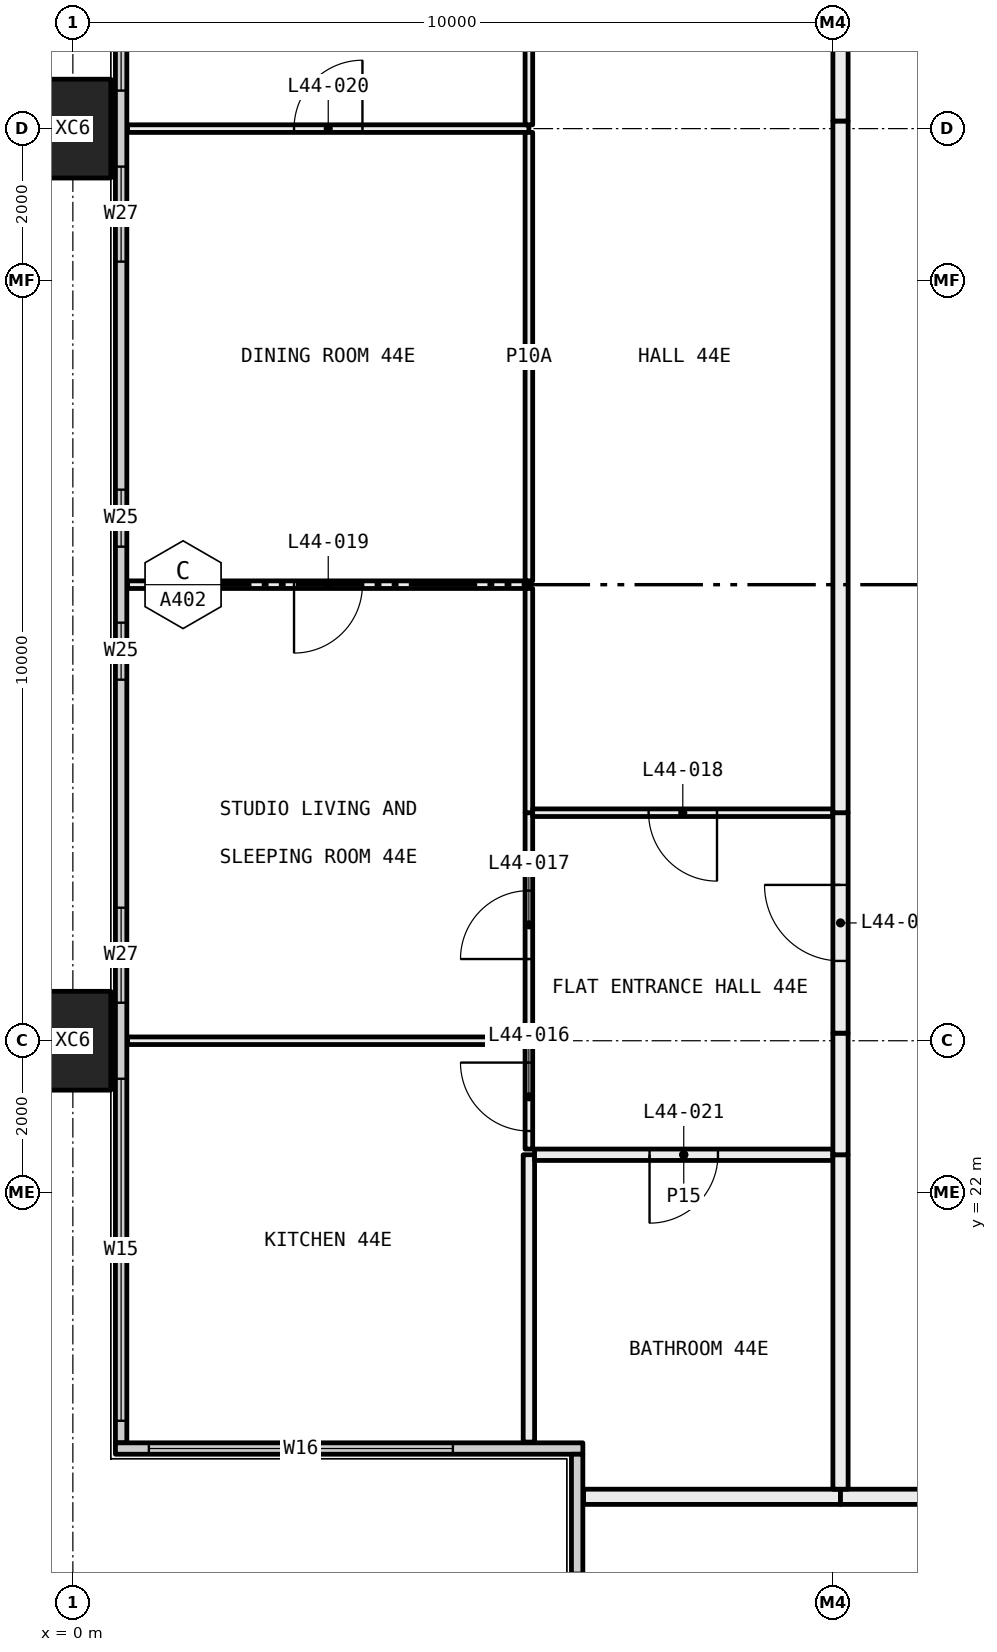
"""IFC4 building model, lengths in metres.
Left out: names, types, materials, properties, quantities, classifications, styles, units other than length and angle.
Written with IfcOpenShell. Run it as: python <this file> out.ifc"""

import sys

from ifc_helpers import new_model, si_unit, direction, frame, frame_2d, origin, origin_2d, place, context, subcontext, project, spatial, rectangle, hollow_rectangle, extrude, element, fill, save


model = new_model("IFC4")
c1 = context("Model", 3, precision=1e-05, world=origin(), true_north=direction((0.0, 1.0)))
c2 = subcontext(c1, "Body", "Model", "MODEL_VIEW")
j1 = project(units=[si_unit("LENGTHUNIT", "METRE"), si_unit("PLANEANGLEUNIT", "RADIAN")], contexts=[c1])
p1 = place(None, origin())
s1 = spatial("IfcSite", under=j1, at=p1, CompositionType="ELEMENT")
p2 = place(p1, origin())
s2 = spatial("IfcBuilding", under=s1, at=p2, CompositionType="ELEMENT")
p3 = place(p2, frame((0.0, 0.0, 168.6)))
s3 = spatial("IfcBuildingStorey", under=s2, at=p3, CompositionType="ELEMENT", Elevation=168.6)
for number, where, z_axis, x_axis in (
    (1, (0.0, 24.0, -0.4), (0.0, 0.0, 1.0), (0.0, 1.0, 0.0)),
    (2, (0.0, 36.0, -0.4), (0.0, 0.0, 1.0), (0.0, 1.0, 0.0)),
):
    element("IfcColumn", number, at=place(p3, frame(where, z_axis=z_axis, x_axis=x_axis)), inside=s3, PredefinedType="COLUMN", context=c2, shape_type="SweptSolid", body=[
        extrude(hollow_rectangle(XDim=1.3, YDim=1.0, WallThickness=0.05, at=origin_2d()), origin(), (0.0, 0.0, 1.0), 3.45),
    ])
p4 = place(p3, frame((0.635, 18.71, 0.0), z_axis=(0.0, 0.0, 1.0), x_axis=(0.0, 1.0, 0.0)))
e3 = element("IfcWall", 3, at=p4, inside=s3, PredefinedType="ELEMENTEDWALL", context=c2, shape_type="SweptSolid", body=[
    extrude(rectangle(XDim=22.58, YDim=0.15, at=frame_2d((11.29, 0.0))), origin(), (0.0, 0.0, 1.0), 3.05),
])
p5 = place(p4, frame((0.29, 0.0, 0.45)))
e4 = element("IfcOpeningElement", 4, at=p5, cuts=e3, PredefinedType="OPENING", context=c2, shape_type="SweptSolid", body=[
    extrude(rectangle(XDim=4.5, YDim=2.55, at=frame_2d((2.25, 1.275))), frame((0.0, 0.085, 0.0), z_axis=(0.0, -1.0, 0.0), x_axis=(1.0, 0.0, 0.0)), (0.0, 0.0, 1.0), 0.17),
])
p6 = place(p4, frame((5.79, 0.0, 0.45)))
e5 = element("IfcOpeningElement", 5, at=p6, cuts=e3, PredefinedType="OPENING", context=c2, shape_type="SweptSolid", body=[
    extrude(rectangle(XDim=1.25, YDim=2.55, at=frame_2d((0.625, 1.275))), frame((0.0, 0.085, 0.0), z_axis=(0.0, -1.0, 0.0), x_axis=(1.0, 0.0, 0.0)), (0.0, 0.0, 1.0), 0.17),
])
p7 = place(p4, frame((10.04, 0.0, 0.45)))
e6 = element("IfcOpeningElement", 6, at=p7, cuts=e3, PredefinedType="OPENING", context=c2, shape_type="SweptSolid", body=[
    extrude(rectangle(XDim=0.75, YDim=2.55, at=frame_2d((0.375, 1.275))), frame((0.0, 0.085, 0.0), z_axis=(0.0, -1.0, 0.0), x_axis=(1.0, 0.0, 0.0)), (0.0, 0.0, 1.0), 0.17),
])
p8 = place(p4, frame((11.79, 0.0, 0.45)))
e7 = element("IfcOpeningElement", 7, at=p8, cuts=e3, PredefinedType="OPENING", context=c2, shape_type="SweptSolid", body=[
    extrude(rectangle(XDim=0.75, YDim=2.55, at=frame_2d((0.375, 1.275))), frame((0.0, 0.085, 0.0), z_axis=(0.0, -1.0, 0.0), x_axis=(1.0, 0.0, 0.0)), (0.0, 0.0, 1.0), 0.17),
])
p9 = place(p4, frame((15.54, 0.0, 0.45)))
e8 = element("IfcOpeningElement", 8, at=p9, cuts=e3, PredefinedType="OPENING", context=c2, shape_type="SweptSolid", body=[
    extrude(rectangle(XDim=1.25, YDim=2.55, at=frame_2d((0.625, 1.275))), frame((0.0, 0.085, 0.0), z_axis=(0.0, -1.0, 0.0), x_axis=(1.0, 0.0, 0.0)), (0.0, 0.0, 1.0), 0.17),
])
p10 = place(p4, frame((17.79, 0.0, 0.45)))
e9 = element("IfcOpeningElement", 9, at=p10, cuts=e3, PredefinedType="OPENING", context=c2, shape_type="SweptSolid", body=[
    extrude(rectangle(XDim=4.5, YDim=2.55, at=frame_2d((2.25, 1.275))), frame((0.0, 0.085, 0.0), z_axis=(0.0, -1.0, 0.0), x_axis=(1.0, 0.0, 0.0)), (0.0, 0.0, 1.0), 0.17),
])
p11 = place(p3, frame((0.56, 18.635, 0.0), z_axis=(0.0, 0.0, 1.0), x_axis=(1.0, 0.0, 0.0)))
e10 = element("IfcWall", 10, at=p11, inside=s3, PredefinedType="ELEMENTEDWALL", context=c2, shape_type="SweptSolid", body=[
    extrude(rectangle(XDim=6.15, YDim=0.15, at=frame_2d((3.075, 0.0))), origin(), (0.0, 0.0, 1.0), 3.05),
])
p12 = place(p11, frame((0.44, 0.0, 0.45)))
e11 = element("IfcOpeningElement", 11, at=p12, cuts=e10, PredefinedType="OPENING", context=c2, shape_type="SweptSolid", body=[
    extrude(rectangle(XDim=4.0, YDim=2.55, at=frame_2d((2.0, 1.275))), frame((0.0, 0.085, 0.0), z_axis=(0.0, -1.0, 0.0), x_axis=(1.0, 0.0, 0.0)), (0.0, 0.0, 1.0), 0.17),
])
p13 = place(p3, frame((6.635, 12.71, 0.0), z_axis=(0.0, 0.0, 1.0), x_axis=(0.0, 1.0, 0.0)))
e12 = element("IfcWall", 12, at=p13, inside=s3, PredefinedType="ELEMENTEDWALL", context=c2, shape_type="SweptSolid", body=[
    extrude(rectangle(XDim=5.85, YDim=0.15, at=frame_2d((2.925, 0.0))), origin(), (0.0, 0.0, 1.0), 3.05),
])
p14 = place(p13, frame((0.29, 0.0, 0.45)))
e13 = element("IfcOpeningElement", 13, at=p14, cuts=e12, PredefinedType="OPENING", context=c2, shape_type="SweptSolid", body=[
    extrude(rectangle(XDim=4.0, YDim=2.55, at=frame_2d((2.0, 1.275))), frame((0.0, 0.085, 0.0), z_axis=(0.0, -1.0, 0.0), x_axis=(1.0, 0.0, 0.0)), (0.0, 0.0, 1.0), 0.17),
])
p15 = place(p3, frame((10.1, 18.0, 0.0), z_axis=(0.0, 0.0, 1.0), x_axis=(-1.0, 0.0, 0.0)))
e14 = element("IfcWall", 14, at=p15, inside=s3, PredefinedType="PARTITIONING", context=c2, shape_type="SweptSolid", body=[
    extrude(rectangle(XDim=3.38, YDim=0.2, at=frame_2d((1.69, 0.0))), origin(), (0.0, 0.0, 1.0), 3.05),
])
p16 = place(p3, frame((12.0, 18.0, 0.0), z_axis=(0.0, 0.0, 1.0), x_axis=(-1.0, 0.0, 0.0)))
e15 = element("IfcWall", 15, at=p16, inside=s3, PredefinedType="PARTITIONING", context=c2, shape_type="SweptSolid", body=[
    extrude(rectangle(XDim=1.9, YDim=0.2, at=frame_2d((0.95, 0.0))), origin(), (0.0, 0.0, 1.0), 3.05),
])
p17 = place(p3, frame((6.0, 24.0, 0.0), z_axis=(0.0, 0.0, 1.0), x_axis=(-1.0, 0.0, 0.0)))
e16 = element("IfcWall", 16, at=p17, inside=s3, PredefinedType="PARTITIONING", context=c2, shape_type="SweptSolid", body=[
    extrude(rectangle(XDim=5.28, YDim=0.1, at=frame_2d((2.64, 0.0))), origin(), (0.0, 0.0, 1.0), 2.45),
])
p18 = place(p3, frame((6.0, 18.72, 0.0), z_axis=(0.0, 0.0, 1.0), x_axis=(0.0, 1.0, 0.0)))
e17 = element("IfcWall", 17, at=p18, inside=s3, PredefinedType="PARTITIONING", context=c2, shape_type="SweptSolid", body=[
    extrude(rectangle(XDim=3.78, YDim=0.15, at=frame_2d((1.89, 0.0))), origin(), (0.0, 0.0, 1.0), 3.05),
])
p19 = place(p3, frame((6.0, 22.575, 0.0), z_axis=(0.0, 0.0, 1.0), x_axis=(0.0, 1.0, 0.0)))
e18 = element("IfcWall", 18, at=p19, inside=s3, PredefinedType="PARTITIONING", context=c2, shape_type="SweptSolid", body=[
    extrude(rectangle(XDim=1.375, YDim=0.1, at=frame_2d((0.688, 0.0))), origin(), (0.0, 0.0, 1.0), 2.45),
])
p20 = place(p19, frame((0.238, 0.0, 0.0)))
e19 = element("IfcOpeningElement", 19, at=p20, cuts=e18, PredefinedType="OPENING", context=c2, shape_type="SweptSolid", body=[
    extrude(rectangle(XDim=0.9, YDim=2.1, at=frame_2d((0.45, 1.05))), frame((0.0, 0.06, 0.0), z_axis=(0.0, -1.0, 0.0), x_axis=(1.0, 0.0, 0.0)), (0.0, 0.0, 1.0), 0.12),
])
p21 = place(p3, frame((6.0, 30.0, 0.0), z_axis=(0.0, 0.0, 1.0), x_axis=(-1.0, 0.0, 0.0)))
e20 = element("IfcWall", 20, at=p21, inside=s3, PredefinedType="PARTITIONING", context=c2, shape_type="SweptSolid", body=[
    extrude(rectangle(XDim=5.28, YDim=0.1, at=frame_2d((2.64, 0.0))), origin(), (0.0, 0.0, 1.0), 3.05),
])
p22 = place(p21, frame((2.19, 0.0, 0.0)))
e21 = element("IfcOpeningElement", 21, at=p22, cuts=e20, PredefinedType="OPENING", context=c2, shape_type="SweptSolid", body=[
    extrude(rectangle(XDim=0.9, YDim=2.1, at=frame_2d((0.45, 1.05))), frame((0.0, 0.06, 0.0), z_axis=(0.0, -1.0, 0.0), x_axis=(1.0, 0.0, 0.0)), (0.0, 0.0, 1.0), 0.12),
])
p23 = place(p3, frame((6.0, 24.05, 0.0), z_axis=(0.0, 0.0, 1.0), x_axis=(0.0, 1.0, 0.0)))
e22 = element("IfcWall", 22, at=p23, inside=s3, PredefinedType="PARTITIONING", context=c2, shape_type="SweptSolid", body=[
    extrude(rectangle(XDim=2.95, YDim=0.1, at=frame_2d((1.475, 0.0))), origin(), (0.0, 0.0, 1.0), 2.45),
])
p24 = place(p23, frame((1.025, 0.0, 0.0)))
e23 = element("IfcOpeningElement", 23, at=p24, cuts=e22, PredefinedType="OPENING", context=c2, shape_type="SweptSolid", body=[
    extrude(rectangle(XDim=0.9, YDim=2.1, at=frame_2d((0.45, 1.05))), frame((0.0, 0.06, 0.0), z_axis=(0.0, -1.0, 0.0), x_axis=(1.0, 0.0, 0.0)), (0.0, 0.0, 1.0), 0.12),
])
p25 = place(p3, frame((6.0, 27.0, 0.0), z_axis=(0.0, 0.0, 1.0), x_axis=(0.0, 1.0, 0.0)))
e24 = element("IfcWall", 24, at=p25, inside=s3, PredefinedType="PARTITIONING", context=c2, shape_type="SweptSolid", body=[
    extrude(rectangle(XDim=2.95, YDim=0.1, at=frame_2d((1.475, 0.0))), origin(), (0.0, 0.0, 1.0), 3.05),
])
p26 = place(p3, frame((6.0, 36.0, 0.0), z_axis=(0.0, 0.0, 1.0), x_axis=(-1.0, 0.0, 0.0)))
e25 = element("IfcWall", 25, at=p26, inside=s3, PredefinedType="PARTITIONING", context=c2, shape_type="SweptSolid", body=[
    extrude(rectangle(XDim=5.28, YDim=0.1, at=frame_2d((2.64, 0.0))), origin(), (0.0, 0.0, 1.0), 2.45),
])
p27 = place(p26, frame((2.19, 0.0, 0.0)))
e26 = element("IfcOpeningElement", 26, at=p27, cuts=e25, PredefinedType="OPENING", context=c2, shape_type="SweptSolid", body=[
    extrude(rectangle(XDim=0.9, YDim=2.1, at=frame_2d((0.45, 1.05))), frame((0.0, 0.06, 0.0), z_axis=(0.0, -1.0, 0.0), x_axis=(1.0, 0.0, 0.0)), (0.0, 0.0, 1.0), 0.12),
])
p28 = place(p3, frame((6.0, 30.05, 0.0), z_axis=(0.0, 0.0, 1.0), x_axis=(0.0, 1.0, 0.0)))
e27 = element("IfcWall", 27, at=p28, inside=s3, PredefinedType="PARTITIONING", context=c2, shape_type="SweptSolid", body=[
    extrude(rectangle(XDim=5.9, YDim=0.1, at=frame_2d((2.95, 0.0))), origin(), (0.0, 0.0, 1.0), 2.45),
])
p29 = place(p3, frame((6.0, 36.05, 0.0), z_axis=(0.0, 0.0, 1.0), x_axis=(0.0, 1.0, 0.0)))
e28 = element("IfcWall", 28, at=p29, inside=s3, PredefinedType="PARTITIONING", context=c2, shape_type="SweptSolid", body=[
    extrude(rectangle(XDim=2.875, YDim=0.1, at=frame_2d((1.438, 0.0))), origin(), (0.0, 0.0, 1.0), 2.45),
])
p30 = place(p3, frame((10.0, 22.5, 0.0), z_axis=(0.0, 0.0, 1.0), x_axis=(-1.0, 0.0, 0.0)))
e29 = element("IfcWall", 29, at=p30, inside=s3, PredefinedType="PARTITIONING", context=c2, shape_type="SweptSolid", body=[
    extrude(rectangle(XDim=3.925, YDim=0.15, at=frame_2d((1.962, 0.0))), origin(), (0.0, 0.0, 1.0), 3.05),
])
p31 = place(p30, frame((1.512, 0.0, 0.0)))
e30 = element("IfcOpeningElement", 30, at=p31, cuts=e29, PredefinedType="OPENING", context=c2, shape_type="SweptSolid", body=[
    extrude(rectangle(XDim=0.9, YDim=2.1, at=frame_2d((0.45, 1.05))), frame((0.0, 0.085, 0.0), z_axis=(0.0, -1.0, 0.0), x_axis=(1.0, 0.0, 0.0)), (0.0, 0.0, 1.0), 0.17),
])
p32 = place(p3, frame((10.1, 18.1, 0.0), z_axis=(0.0, 0.0, 1.0), x_axis=(0.0, 1.0, 0.0)))
e31 = element("IfcWall", 31, at=p32, inside=s3, PredefinedType="PARTITIONING", context=c2, shape_type="SweptSolid", body=[
    extrude(rectangle(XDim=4.4, YDim=0.2, at=frame_2d((2.2, 0.0))), origin(), (0.0, 0.0, 1.0), 3.05),
])
p33 = place(p3, frame((10.0, 27.0, 0.0), z_axis=(0.0, 0.0, 1.0), x_axis=(-1.0, 0.0, 0.0)))
e32 = element("IfcWall", 32, at=p33, inside=s3, PredefinedType="PARTITIONING", context=c2, shape_type="SweptSolid", body=[
    extrude(rectangle(XDim=3.95, YDim=0.1, at=frame_2d((1.975, 0.0))), origin(), (0.0, 0.0, 1.0), 3.05),
])
p34 = place(p33, frame((1.525, 0.0, 0.0)))
e33 = element("IfcOpeningElement", 33, at=p34, cuts=e32, PredefinedType="OPENING", context=c2, shape_type="SweptSolid", body=[
    extrude(rectangle(XDim=0.9, YDim=2.1, at=frame_2d((0.45, 1.05))), frame((0.0, 0.06, 0.0), z_axis=(0.0, -1.0, 0.0), x_axis=(1.0, 0.0, 0.0)), (0.0, 0.0, 1.0), 0.12),
])
p35 = place(p3, frame((10.1, 22.5, 0.0), z_axis=(0.0, 0.0, 1.0), x_axis=(0.0, 1.0, 0.0)))
e34 = element("IfcWall", 34, at=p35, inside=s3, PredefinedType="PARTITIONING", context=c2, shape_type="SweptSolid", body=[
    extrude(rectangle(XDim=1.6, YDim=0.2, at=frame_2d((0.8, 0.0))), origin(), (0.0, 0.0, 1.0), 2.45),
])
p36 = place(p3, frame((10.1, 24.1, 0.0), z_axis=(0.0, 0.0, 1.0), x_axis=(0.0, 1.0, 0.0)))
e35 = element("IfcWall", 35, at=p36, inside=s3, PredefinedType="PARTITIONING", context=c2, shape_type="SweptSolid", body=[
    extrude(rectangle(XDim=2.9, YDim=0.2, at=frame_2d((1.45, 0.0))), origin(), (0.0, 0.0, 1.0), 3.05),
])
p37 = place(p36, frame((0.95, 0.0, 0.0)))
e36 = element("IfcOpeningElement", 36, at=p37, cuts=e35, PredefinedType="OPENING", context=c2, shape_type="SweptSolid", body=[
    extrude(rectangle(XDim=1.0, YDim=2.1, at=frame_2d((0.5, 1.05))), frame((0.0, 0.11, 0.0), z_axis=(0.0, -1.0, 0.0), x_axis=(1.0, 0.0, 0.0)), (0.0, 0.0, 1.0), 0.22),
])
p38 = place(p3, frame((10.1, 27.0, 0.0), z_axis=(0.0, 0.0, 1.0), x_axis=(0.0, 1.0, 0.0)))
e37 = element("IfcWall", 37, at=p38, inside=s3, PredefinedType="PARTITIONING", context=c2, shape_type="SweptSolid", body=[
    extrude(rectangle(XDim=9.1, YDim=0.2, at=frame_2d((4.55, 0.0))), origin(), (0.0, 0.0, 1.0), 2.45),
])
p39 = place(p3, frame((10.1, 36.1, 0.0), z_axis=(0.0, 0.0, 1.0), x_axis=(0.0, 1.0, 0.0)))
e38 = element("IfcWall", 38, at=p39, inside=s3, PredefinedType="PARTITIONING", context=c2, shape_type="SweptSolid", body=[
    extrude(rectangle(XDim=2.9, YDim=0.2, at=frame_2d((1.45, 0.0))), origin(), (0.0, 0.0, 1.0), 3.05),
])
p40 = place(p5, origin())
e39 = element("IfcWindow", 39, at=p40, inside=s3, PartitioningType="SINGLE_PANEL", PredefinedType="WINDOW", context=c2, shape_type="SweptSolid", body=[
    extrude(rectangle(XDim=4.5, YDim=2.55, at=frame_2d((2.25, 1.275))), frame((0.0, 0.03, 0.0), z_axis=(0.0, -1.0, 0.0), x_axis=(1.0, 0.0, 0.0)), (0.0, 0.0, 1.0), 0.06),
])
fill(e4, e39)
p41 = place(p6, origin())
e40 = element("IfcWindow", 40, at=p41, inside=s3, PartitioningType="SINGLE_PANEL", PredefinedType="WINDOW", context=c2, shape_type="SweptSolid", body=[
    extrude(rectangle(XDim=1.25, YDim=2.55, at=frame_2d((0.625, 1.275))), frame((0.0, 0.03, 0.0), z_axis=(0.0, -1.0, 0.0), x_axis=(1.0, 0.0, 0.0)), (0.0, 0.0, 1.0), 0.06),
])
fill(e5, e40)
p42 = place(p7, origin())
e41 = element("IfcWindow", 41, at=p42, inside=s3, PartitioningType="SINGLE_PANEL", PredefinedType="WINDOW", context=c2, shape_type="SweptSolid", body=[
    extrude(rectangle(XDim=0.75, YDim=2.55, at=frame_2d((0.375, 1.275))), frame((0.0, 0.03, 0.0), z_axis=(0.0, -1.0, 0.0), x_axis=(1.0, 0.0, 0.0)), (0.0, 0.0, 1.0), 0.06),
])
fill(e6, e41)
p43 = place(p8, origin())
e42 = element("IfcWindow", 42, at=p43, inside=s3, PartitioningType="SINGLE_PANEL", PredefinedType="WINDOW", context=c2, shape_type="SweptSolid", body=[
    extrude(rectangle(XDim=0.75, YDim=2.55, at=frame_2d((0.375, 1.275))), frame((0.0, 0.03, 0.0), z_axis=(0.0, -1.0, 0.0), x_axis=(1.0, 0.0, 0.0)), (0.0, 0.0, 1.0), 0.06),
])
fill(e7, e42)
p44 = place(p9, origin())
e43 = element("IfcWindow", 43, at=p44, inside=s3, PartitioningType="SINGLE_PANEL", PredefinedType="WINDOW", context=c2, shape_type="SweptSolid", body=[
    extrude(rectangle(XDim=1.25, YDim=2.55, at=frame_2d((0.625, 1.275))), frame((0.0, 0.03, 0.0), z_axis=(0.0, -1.0, 0.0), x_axis=(1.0, 0.0, 0.0)), (0.0, 0.0, 1.0), 0.06),
])
fill(e8, e43)
p45 = place(p10, origin())
e44 = element("IfcWindow", 44, at=p45, inside=s3, PartitioningType="SINGLE_PANEL", PredefinedType="WINDOW", context=c2, shape_type="SweptSolid", body=[
    extrude(rectangle(XDim=4.5, YDim=2.55, at=frame_2d((2.25, 1.275))), frame((0.0, 0.03, 0.0), z_axis=(0.0, -1.0, 0.0), x_axis=(1.0, 0.0, 0.0)), (0.0, 0.0, 1.0), 0.06),
])
fill(e9, e44)
p46 = place(p12, origin())
e45 = element("IfcWindow", 45, at=p46, inside=s3, PartitioningType="SINGLE_PANEL", PredefinedType="WINDOW", context=c2, shape_type="SweptSolid", body=[
    extrude(rectangle(XDim=4.0, YDim=2.55, at=frame_2d((2.0, 1.275))), frame((0.0, 0.03, 0.0), z_axis=(0.0, -1.0, 0.0), x_axis=(1.0, 0.0, 0.0)), (0.0, 0.0, 1.0), 0.06),
])
fill(e11, e45)
p47 = place(p37, origin())
e46 = element("IfcDoor", 46, at=p47, inside=s3, OperationType="SINGLE_SWING_LEFT", PredefinedType="DOOR", context=c2, shape_type="SweptSolid", body=[
    extrude(rectangle(XDim=1.0, YDim=2.1, at=frame_2d((0.5, 1.05))), frame((0.0, 0.025, 0.0), z_axis=(0.0, -1.0, 0.0), x_axis=(1.0, 0.0, 0.0)), (0.0, 0.0, 1.0), 0.05),
])
fill(e36, e46)
p48 = place(p20, origin())
e47 = element("IfcDoor", 47, at=p48, inside=s3, OperationType="SINGLE_SWING_LEFT", PredefinedType="DOOR", context=c2, shape_type="SweptSolid", body=[
    extrude(rectangle(XDim=0.9, YDim=2.1, at=frame_2d((0.45, 1.05))), frame((0.0, 0.025, 0.0), z_axis=(0.0, -1.0, 0.0), x_axis=(1.0, 0.0, 0.0)), (0.0, 0.0, 1.0), 0.05),
])
fill(e19, e47)
p49 = place(p24, origin())
e48 = element("IfcDoor", 48, at=p49, inside=s3, OperationType="SINGLE_SWING_RIGHT", PredefinedType="DOOR", context=c2, shape_type="SweptSolid", body=[
    extrude(rectangle(XDim=0.9, YDim=2.1, at=frame_2d((0.45, 1.05))), frame((0.0, 0.025, 0.0), z_axis=(0.0, -1.0, 0.0), x_axis=(1.0, 0.0, 0.0)), (0.0, 0.0, 1.0), 0.05),
])
fill(e23, e48)
p50 = place(p34, origin())
e49 = element("IfcDoor", 49, at=p50, inside=s3, OperationType="SINGLE_SWING_RIGHT", PredefinedType="DOOR", context=c2, shape_type="SweptSolid", body=[
    extrude(rectangle(XDim=0.9, YDim=2.1, at=frame_2d((0.45, 1.05))), frame((0.0, 0.025, 0.0), z_axis=(0.0, -1.0, 0.0), x_axis=(1.0, 0.0, 0.0)), (0.0, 0.0, 1.0), 0.05),
])
fill(e33, e49)
p51 = place(p22, origin())
e50 = element("IfcDoor", 50, at=p51, inside=s3, OperationType="SINGLE_SWING_LEFT", PredefinedType="DOOR", context=c2, shape_type="SweptSolid", body=[
    extrude(rectangle(XDim=0.9, YDim=2.1, at=frame_2d((0.45, 1.05))), frame((0.0, 0.025, 0.0), z_axis=(0.0, -1.0, 0.0), x_axis=(1.0, 0.0, 0.0)), (0.0, 0.0, 1.0), 0.05),
])
fill(e21, e50)
p52 = place(p27, frame((0.9, 0.0, 0.0), x_axis=(-1.0, 0.0, 0.0)))
e51 = element("IfcDoor", 51, at=p52, inside=s3, OperationType="SINGLE_SWING_LEFT", PredefinedType="DOOR", context=c2, shape_type="SweptSolid", body=[
    extrude(rectangle(XDim=0.9, YDim=2.1, at=frame_2d((0.45, 1.05))), frame((0.0, 0.025, 0.0), z_axis=(0.0, -1.0, 0.0), x_axis=(1.0, 0.0, 0.0)), (0.0, 0.0, 1.0), 0.05),
])
fill(e26, e51)
p53 = place(p31, origin())
e52 = element("IfcDoor", 52, at=p53, inside=s3, OperationType="SINGLE_SWING_LEFT", PredefinedType="DOOR", context=c2, shape_type="SweptSolid", body=[
    extrude(rectangle(XDim=0.9, YDim=2.1, at=frame_2d((0.45, 1.05))), frame((0.0, 0.025, 0.0), z_axis=(0.0, -1.0, 0.0), x_axis=(1.0, 0.0, 0.0)), (0.0, 0.0, 1.0), 0.05),
])
fill(e30, e52)
save(model, sys.argv[1])
